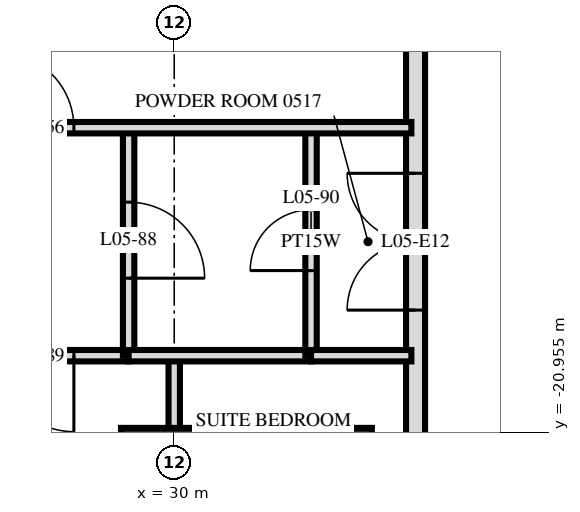
"""IFC4 building model, lengths in metres.
Left out: names, types, materials, properties, quantities, classifications, styles, units other than length and angle.
Written with IfcOpenShell. Run it as: python <this file> out.ifc"""

import sys

from ifc_helpers import new_model, si_unit, direction, frame, frame_2d, origin, origin_2d, place, context, subcontext, project, spatial, rectangle, extrude, element, fill, save


model = new_model("IFC4")
c1 = context("Model", 3, precision=1e-05, world=origin(), true_north=direction((0.0, 1.0)))
c2 = subcontext(c1, "Body", "Model", "MODEL_VIEW")
j1 = project(units=[si_unit("LENGTHUNIT", "METRE"), si_unit("PLANEANGLEUNIT", "RADIAN")], contexts=[c1])
p1 = place(None, origin())
s1 = spatial("IfcSite", under=j1, at=p1, CompositionType="ELEMENT")
p2 = place(p1, origin())
s2 = spatial("IfcBuilding", under=s1, at=p2, CompositionType="ELEMENT")
p3 = place(p2, frame((0.0, 0.0, 27.6)))
s3 = spatial("IfcBuildingStorey", under=s2, at=p3, CompositionType="ELEMENT", Elevation=27.6)
p4 = place(p3, frame((30.0, -21.6, 0.0), z_axis=(0.0, 0.0, 1.0), x_axis=(1.0, 0.0, 0.0)))
e1 = element("IfcColumn", 1, at=p4, inside=s3, PredefinedType="COLUMN", context=c2, shape_type="SweptSolid", body=[
    extrude(rectangle(XDim=1.4, YDim=1.4, at=origin_2d()), origin(), (0.0, 0.0, 1.0), 3.6),
])
p5 = place(p3, frame((32.1, -21.6, 0.0), z_axis=(0.0, 0.0, 1.0), x_axis=(0.0, 1.0, 0.0)))
e2 = element("IfcColumn", 2, at=p5, inside=s3, PredefinedType="COLUMN", context=c2, shape_type="SweptSolid", body=[
    extrude(rectangle(XDim=1.4, YDim=1.0, at=origin_2d()), origin(), (0.0, 0.0, 1.0), 3.6),
])
p6 = place(p3, frame((33.175, -24.875, 0.0), z_axis=(0.0, 0.0, 1.0), x_axis=(0.0, 1.0, 0.0)))
e3 = element("IfcWall", 3, at=p6, inside=s3, PredefinedType="SOLIDWALL", context=c2, shape_type="SweptSolid", body=[
    extrude(rectangle(XDim=21.551, YDim=0.25, at=frame_2d((10.775, 0.0))), origin(), (0.0, 0.0, 1.0), 3.32),
])
p7 = place(p6, frame((0.575, 0.0, 0.0)))
e4 = element("IfcOpeningElement", 4, at=p7, cuts=e3, PredefinedType="OPENING", context=c2, shape_type="SweptSolid", body=[
    extrude(rectangle(XDim=1.8, YDim=2.4, at=frame_2d((0.9, 1.2))), frame((0.0, 0.135, 0.0), z_axis=(0.0, -1.0, 0.0), x_axis=(1.0, 0.0, 0.0)), (0.0, 0.0, 1.0), 0.27),
])
p8 = place(p6, frame((5.525, 0.0, 0.0)))
e5 = element("IfcOpeningElement", 5, at=p8, cuts=e3, PredefinedType="OPENING", context=c2, shape_type="SweptSolid", body=[
    extrude(rectangle(XDim=1.8, YDim=2.4, at=frame_2d((0.9, 1.2))), frame((0.0, 0.135, 0.0), z_axis=(0.0, -1.0, 0.0), x_axis=(1.0, 0.0, 0.0)), (0.0, 0.0, 1.0), 0.27),
])
p9 = place(p6, frame((12.725, 0.0, 0.0)))
e6 = element("IfcOpeningElement", 6, at=p9, cuts=e3, PredefinedType="OPENING", context=c2, shape_type="SweptSolid", body=[
    extrude(rectangle(XDim=1.8, YDim=2.4, at=frame_2d((0.9, 1.2))), frame((0.0, 0.135, 0.0), z_axis=(0.0, -1.0, 0.0), x_axis=(1.0, 0.0, 0.0)), (0.0, 0.0, 1.0), 0.27),
])
p10 = place(p3, frame((31.8, -19.95, 0.0), z_axis=(0.0, 0.0, 1.0), x_axis=(0.0, 1.0, 0.0)))
e7 = element("IfcWall", 7, at=p10, inside=s3, PredefinedType="PLUMBINGWALL", context=c2, shape_type="SweptSolid", body=[
    extrude(rectangle(XDim=3.0, YDim=0.15, at=frame_2d((1.5, 0.0))), origin(), (0.0, 0.0, 1.0), 3.32),
])
p11 = place(p10, frame((1.12, 0.0, 0.0)))
e8 = element("IfcOpeningElement", 8, at=p11, cuts=e7, PredefinedType="OPENING", context=c2, shape_type="SweptSolid", body=[
    extrude(rectangle(XDim=0.8, YDim=2.1, at=frame_2d((0.4, 1.05))), frame((0.0, 0.085, 0.0), z_axis=(0.0, -1.0, 0.0), x_axis=(1.0, 0.0, 0.0)), (0.0, 0.0, 1.0), 0.17),
])
p12 = place(p3, frame((30.0, -28.978, 0.0), z_axis=(0.0, 0.0, 1.0), x_axis=(0.0, 1.0, 0.0)))
e9 = element("IfcWall", 9, at=p12, inside=s3, PredefinedType="PARTITIONING", context=c2, shape_type="SweptSolid", body=[
    extrude(rectangle(XDim=9.028, YDim=0.15, at=frame_2d((4.514, 0.0))), origin(), (0.0, 0.0, 1.0), 3.32),
])
p13 = place(p12, frame((3.958, 0.0, 0.0)))
e10 = element("IfcOpeningElement", 10, at=p13, cuts=e9, PredefinedType="OPENING", context=c2, shape_type="SweptSolid", body=[
    extrude(rectangle(XDim=0.9, YDim=2.1, at=frame_2d((0.45, 1.05))), frame((0.0, 0.085, 0.0), z_axis=(0.0, -1.0, 0.0), x_axis=(1.0, 0.0, 0.0)), (0.0, 0.0, 1.0), 0.17),
])
p14 = place(p3, frame((29.4, -19.95, 0.0), z_axis=(0.0, 0.0, 1.0), x_axis=(0.0, 1.0, 0.0)))
e11 = element("IfcWall", 11, at=p14, inside=s3, PredefinedType="PARTITIONING", context=c2, shape_type="SweptSolid", body=[
    extrude(rectangle(XDim=3.0, YDim=0.15, at=frame_2d((1.5, 0.0))), origin(), (0.0, 0.0, 1.0), 3.32),
])
p15 = place(p14, frame((1.02, 0.0, 0.0)))
e12 = element("IfcOpeningElement", 12, at=p15, cuts=e11, PredefinedType="OPENING", context=c2, shape_type="SweptSolid", body=[
    extrude(rectangle(XDim=1.0, YDim=2.1, at=frame_2d((0.5, 1.05))), frame((0.0, 0.085, 0.0), z_axis=(0.0, -1.0, 0.0), x_axis=(1.0, 0.0, 0.0)), (0.0, 0.0, 1.0), 0.17),
])
p16 = place(p3, frame((27.0, -19.95, 0.0), z_axis=(0.0, 0.0, 1.0), x_axis=(1.0, 0.0, 0.0)))
e13 = element("IfcWall", 13, at=p16, inside=s3, PredefinedType="PARTITIONING", context=c2, shape_type="SweptSolid", body=[
    extrude(rectangle(XDim=2.4, YDim=0.15, at=frame_2d((1.2, 0.0))), origin(), (0.0, 0.0, 1.0), 3.32),
])
p17 = place(p16, frame((0.68, 0.0, 0.0)))
e14 = element("IfcOpeningElement", 14, at=p17, cuts=e13, PredefinedType="OPENING", context=c2, shape_type="SweptSolid", body=[
    extrude(rectangle(XDim=1.0, YDim=2.1, at=frame_2d((0.5, 1.05))), frame((0.0, 0.085, 0.0), z_axis=(0.0, -1.0, 0.0), x_axis=(1.0, 0.0, 0.0)), (0.0, 0.0, 1.0), 0.17),
])
p18 = place(p3, frame((29.4, -19.95, 0.0), z_axis=(0.0, 0.0, 1.0), x_axis=(1.0, 0.0, 0.0)))
e15 = element("IfcWall", 15, at=p18, inside=s3, PredefinedType="PARTITIONING", context=c2, shape_type="SweptSolid", body=[
    extrude(rectangle(XDim=2.4, YDim=0.15, at=frame_2d((1.2, 0.0))), origin(), (0.0, 0.0, 1.0), 3.32),
])
p19 = place(p3, frame((31.8, -19.95, 0.0), z_axis=(0.0, 0.0, 1.0), x_axis=(1.0, 0.0, 0.0)))
e16 = element("IfcWall", 16, at=p19, inside=s3, PredefinedType="PLUMBINGWALL", context=c2, shape_type="SweptSolid", body=[
    extrude(rectangle(XDim=1.32, YDim=0.15, at=frame_2d((0.66, 0.0))), origin(), (0.0, 0.0, 1.0), 3.32),
])
p20 = place(p3, frame((-33.12, -16.95, 0.0), z_axis=(0.0, 0.0, 1.0), x_axis=(1.0, 0.0, 0.0)))
e17 = element("IfcWall", 17, at=p20, inside=s3, PredefinedType="PARTITIONING", context=c2, shape_type="SweptSolid", body=[
    extrude(rectangle(XDim=66.24, YDim=0.15, at=frame_2d((33.12, 0.0))), origin(), (0.0, 0.0, 1.0), 3.32),
])
p21 = place(p20, frame((9.27, 0.0, 0.0)))
e18 = element("IfcOpeningElement", 18, at=p21, cuts=e17, PredefinedType="OPENING", context=c2, shape_type="SweptSolid", body=[
    extrude(rectangle(XDim=1.0, YDim=2.1, at=frame_2d((0.5, 1.05))), frame((0.0, 0.085, 0.0), z_axis=(0.0, -1.0, 0.0), x_axis=(1.0, 0.0, 0.0)), (0.0, 0.0, 1.0), 0.17),
])
p22 = place(p20, frame((13.97, 0.0, 0.0)))
e19 = element("IfcOpeningElement", 19, at=p22, cuts=e17, PredefinedType="OPENING", context=c2, shape_type="SweptSolid", body=[
    extrude(rectangle(XDim=1.0, YDim=2.1, at=frame_2d((0.5, 1.05))), frame((0.0, 0.085, 0.0), z_axis=(0.0, -1.0, 0.0), x_axis=(1.0, 0.0, 0.0)), (0.0, 0.0, 1.0), 0.17),
])
p23 = place(p20, frame((15.27, 0.0, 0.0)))
e20 = element("IfcOpeningElement", 20, at=p23, cuts=e17, PredefinedType="OPENING", context=c2, shape_type="SweptSolid", body=[
    extrude(rectangle(XDim=1.0, YDim=2.1, at=frame_2d((0.5, 1.05))), frame((0.0, 0.085, 0.0), z_axis=(0.0, -1.0, 0.0), x_axis=(1.0, 0.0, 0.0)), (0.0, 0.0, 1.0), 0.17),
])
p24 = place(p20, frame((19.97, 0.0, 0.0)))
e21 = element("IfcOpeningElement", 21, at=p24, cuts=e17, PredefinedType="OPENING", context=c2, shape_type="SweptSolid", body=[
    extrude(rectangle(XDim=1.0, YDim=2.1, at=frame_2d((0.5, 1.05))), frame((0.0, 0.085, 0.0), z_axis=(0.0, -1.0, 0.0), x_axis=(1.0, 0.0, 0.0)), (0.0, 0.0, 1.0), 0.17),
])
p25 = place(p20, frame((22.27, 0.0, 0.0)))
e22 = element("IfcOpeningElement", 22, at=p25, cuts=e17, PredefinedType="OPENING", context=c2, shape_type="SweptSolid", body=[
    extrude(rectangle(XDim=1.0, YDim=2.1, at=frame_2d((0.5, 1.05))), frame((0.0, 0.085, 0.0), z_axis=(0.0, -1.0, 0.0), x_axis=(1.0, 0.0, 0.0)), (0.0, 0.0, 1.0), 0.17),
])
p26 = place(p20, frame((28.97, 0.0, 0.0)))
e23 = element("IfcOpeningElement", 23, at=p26, cuts=e17, PredefinedType="OPENING", context=c2, shape_type="SweptSolid", body=[
    extrude(rectangle(XDim=1.0, YDim=2.1, at=frame_2d((0.5, 1.05))), frame((0.0, 0.085, 0.0), z_axis=(0.0, -1.0, 0.0), x_axis=(1.0, 0.0, 0.0)), (0.0, 0.0, 1.0), 0.17),
])
p27 = place(p20, frame((30.27, 0.0, 0.0)))
e24 = element("IfcOpeningElement", 24, at=p27, cuts=e17, PredefinedType="OPENING", context=c2, shape_type="SweptSolid", body=[
    extrude(rectangle(XDim=1.0, YDim=2.1, at=frame_2d((0.5, 1.05))), frame((0.0, 0.085, 0.0), z_axis=(0.0, -1.0, 0.0), x_axis=(1.0, 0.0, 0.0)), (0.0, 0.0, 1.0), 0.17),
])
p28 = place(p20, frame((34.97, 0.0, 0.0)))
e25 = element("IfcOpeningElement", 25, at=p28, cuts=e17, PredefinedType="OPENING", context=c2, shape_type="SweptSolid", body=[
    extrude(rectangle(XDim=1.0, YDim=2.1, at=frame_2d((0.5, 1.05))), frame((0.0, 0.085, 0.0), z_axis=(0.0, -1.0, 0.0), x_axis=(1.0, 0.0, 0.0)), (0.0, 0.0, 1.0), 0.17),
])
p29 = place(p20, frame((36.27, 0.0, 0.0)))
e26 = element("IfcOpeningElement", 26, at=p29, cuts=e17, PredefinedType="OPENING", context=c2, shape_type="SweptSolid", body=[
    extrude(rectangle(XDim=1.0, YDim=2.1, at=frame_2d((0.5, 1.05))), frame((0.0, 0.085, 0.0), z_axis=(0.0, -1.0, 0.0), x_axis=(1.0, 0.0, 0.0)), (0.0, 0.0, 1.0), 0.17),
])
p30 = place(p20, frame((40.97, 0.0, 0.0)))
e27 = element("IfcOpeningElement", 27, at=p30, cuts=e17, PredefinedType="OPENING", context=c2, shape_type="SweptSolid", body=[
    extrude(rectangle(XDim=1.0, YDim=2.1, at=frame_2d((0.5, 1.05))), frame((0.0, 0.085, 0.0), z_axis=(0.0, -1.0, 0.0), x_axis=(1.0, 0.0, 0.0)), (0.0, 0.0, 1.0), 0.17),
])
p31 = place(p20, frame((42.27, 0.0, 0.0)))
e28 = element("IfcOpeningElement", 28, at=p31, cuts=e17, PredefinedType="OPENING", context=c2, shape_type="SweptSolid", body=[
    extrude(rectangle(XDim=1.0, YDim=2.1, at=frame_2d((0.5, 1.05))), frame((0.0, 0.085, 0.0), z_axis=(0.0, -1.0, 0.0), x_axis=(1.0, 0.0, 0.0)), (0.0, 0.0, 1.0), 0.17),
])
p32 = place(p20, frame((46.97, 0.0, 0.0)))
e29 = element("IfcOpeningElement", 29, at=p32, cuts=e17, PredefinedType="OPENING", context=c2, shape_type="SweptSolid", body=[
    extrude(rectangle(XDim=1.0, YDim=2.1, at=frame_2d((0.5, 1.05))), frame((0.0, 0.085, 0.0), z_axis=(0.0, -1.0, 0.0), x_axis=(1.0, 0.0, 0.0)), (0.0, 0.0, 1.0), 0.17),
])
p33 = place(p20, frame((48.27, 0.0, 0.0)))
e30 = element("IfcOpeningElement", 30, at=p33, cuts=e17, PredefinedType="OPENING", context=c2, shape_type="SweptSolid", body=[
    extrude(rectangle(XDim=1.0, YDim=2.1, at=frame_2d((0.5, 1.05))), frame((0.0, 0.085, 0.0), z_axis=(0.0, -1.0, 0.0), x_axis=(1.0, 0.0, 0.0)), (0.0, 0.0, 1.0), 0.17),
])
p34 = place(p20, frame((52.97, 0.0, 0.0)))
e31 = element("IfcOpeningElement", 31, at=p34, cuts=e17, PredefinedType="OPENING", context=c2, shape_type="SweptSolid", body=[
    extrude(rectangle(XDim=1.0, YDim=2.1, at=frame_2d((0.5, 1.05))), frame((0.0, 0.085, 0.0), z_axis=(0.0, -1.0, 0.0), x_axis=(1.0, 0.0, 0.0)), (0.0, 0.0, 1.0), 0.17),
])
p35 = place(p20, frame((54.27, 0.0, 0.0)))
e32 = element("IfcOpeningElement", 32, at=p35, cuts=e17, PredefinedType="OPENING", context=c2, shape_type="SweptSolid", body=[
    extrude(rectangle(XDim=1.0, YDim=2.1, at=frame_2d((0.5, 1.05))), frame((0.0, 0.085, 0.0), z_axis=(0.0, -1.0, 0.0), x_axis=(1.0, 0.0, 0.0)), (0.0, 0.0, 1.0), 0.17),
])
p36 = place(p20, frame((4.4, 0.0, 0.0)))
e33 = element("IfcOpeningElement", 33, at=p36, cuts=e17, PredefinedType="OPENING", context=c2, shape_type="SweptSolid", body=[
    extrude(rectangle(XDim=1.0, YDim=2.1, at=frame_2d((0.5, 1.05))), frame((0.0, 0.085, 0.0), z_axis=(0.0, -1.0, 0.0), x_axis=(1.0, 0.0, 0.0)), (0.0, 0.0, 1.0), 0.17),
])
p37 = place(p20, frame((60.8, 0.0, 0.0)))
e34 = element("IfcOpeningElement", 34, at=p37, cuts=e17, PredefinedType="OPENING", context=c2, shape_type="SweptSolid", body=[
    extrude(rectangle(XDim=1.0, YDim=2.1, at=frame_2d((0.5, 1.05))), frame((0.0, 0.085, 0.0), z_axis=(0.0, -1.0, 0.0), x_axis=(1.0, 0.0, 0.0)), (0.0, 0.0, 1.0), 0.17),
])
p38 = place(p8, origin())
e35 = element("IfcDoor", 35, at=p38, inside=s3, OperationType="DOUBLE_DOOR_SINGLE_SWING", PredefinedType="DOOR", context=c2, shape_type="SweptSolid", body=[
    extrude(rectangle(XDim=1.8, YDim=2.4, at=frame_2d((0.9, 1.2))), frame((0.0, 0.025, 0.0), z_axis=(0.0, -1.0, 0.0), x_axis=(1.0, 0.0, 0.0)), (0.0, 0.0, 1.0), 0.05),
])
fill(e5, e35)
p39 = place(p37, origin())
e36 = element("IfcDoor", 36, at=p39, inside=s3, OperationType="SINGLE_SWING_RIGHT", PredefinedType="DOOR", context=c2, shape_type="SweptSolid", body=[
    extrude(rectangle(XDim=1.0, YDim=2.1, at=frame_2d((0.5, 1.05))), frame((0.0, 0.025, 0.0), z_axis=(0.0, -1.0, 0.0), x_axis=(1.0, 0.0, 0.0)), (0.0, 0.0, 1.0), 0.05),
])
fill(e34, e36)
p40 = place(p15, frame((0.5, 0.0, 0.0), z_axis=(0.0, 0.0, 1.0), x_axis=(-1.0, 0.0, 0.0)))
e37 = element("IfcDoor", 37, at=p40, inside=s3, OperationType="SINGLE_SWING_LEFT", PredefinedType="DOOR", context=c2, shape_type="SweptSolid", body=[
    extrude(rectangle(XDim=1.0, YDim=2.1, at=frame_2d((0.0, 1.05))), frame((0.0, -0.025, 0.0), z_axis=(0.0, 1.0, 0.0), x_axis=(-1.0, 0.0, 0.0)), (0.0, 0.0, 1.0), 0.05),
])
fill(e12, e37)
p41 = place(p17, frame((0.5, 0.0, 0.0), z_axis=(0.0, 0.0, 1.0), x_axis=(-1.0, 0.0, 0.0)))
e38 = element("IfcDoor", 38, at=p41, inside=s3, OperationType="SINGLE_SWING_RIGHT", PredefinedType="DOOR", context=c2, shape_type="SweptSolid", body=[
    extrude(rectangle(XDim=1.0, YDim=2.1, at=frame_2d((0.0, 1.05))), frame((0.0, -0.025, 0.0), z_axis=(0.0, 1.0, 0.0), x_axis=(-1.0, 0.0, 0.0)), (0.0, 0.0, 1.0), 0.05),
])
fill(e14, e38)
p42 = place(p11, origin())
e39 = element("IfcDoor", 39, at=p42, inside=s3, OperationType="SINGLE_SWING_RIGHT", PredefinedType="DOOR", context=c2, shape_type="SweptSolid", body=[
    extrude(rectangle(XDim=0.8, YDim=2.1, at=frame_2d((0.4, 1.05))), frame((0.0, 0.025, 0.0), z_axis=(0.0, -1.0, 0.0), x_axis=(1.0, 0.0, 0.0)), (0.0, 0.0, 1.0), 0.05),
])
fill(e8, e39)
save(model, sys.argv[1])
